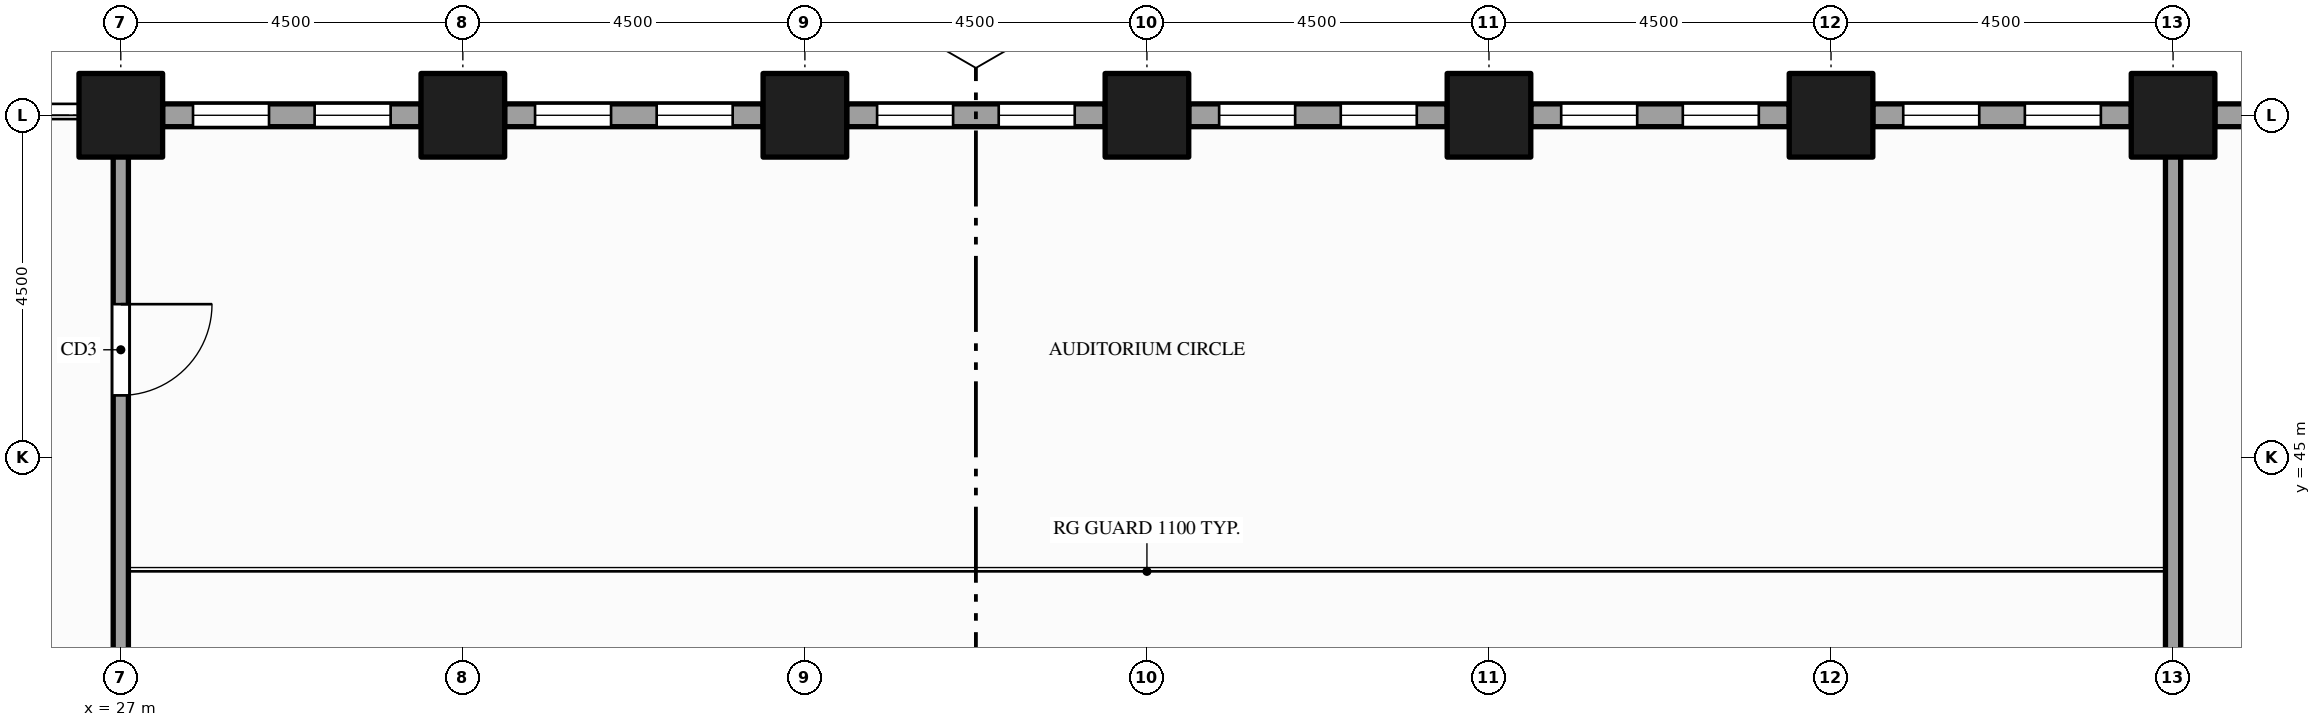
"""IFC4 building model, lengths in metres.
Left out: names, types, materials, properties, quantities, classifications, styles, units other than length and angle.
Written with IfcOpenShell. Run it as: python <this file> out.ifc"""

import sys

from ifc_helpers import new_model, si_unit, direction, frame, frame_2d, origin, origin_2d, place, context, subcontext, project, spatial, rectangle, hollow_rectangle, extrude, element, fill, save


model = new_model("IFC4")
c1 = context("Model", 3, precision=1e-05, world=origin(), true_north=direction((0.0, 1.0)))
c2 = subcontext(c1, "Body", "Model", "MODEL_VIEW")
j1 = project(units=[si_unit("LENGTHUNIT", "METRE"), si_unit("PLANEANGLEUNIT", "RADIAN")], contexts=[c1])
p1 = place(None, origin())
s1 = spatial("IfcSite", under=j1, at=p1, CompositionType="ELEMENT")
p2 = place(p1, origin())
s2 = spatial("IfcBuilding", under=s1, at=p2, CompositionType="ELEMENT")
p3 = place(p2, frame((0.0, 0.0, 8.0)))
s3 = spatial("IfcBuildingStorey", under=s2, at=p3, CompositionType="ELEMENT", Elevation=8.0)
for number, where, z_axis, x_axis in (
    (1, (27.0, 49.5, -0.25), (0.0, 0.0, 1.0), (1.0, 0.0, 0.0)),
    (2, (31.5, 49.5, -0.25), (0.0, 0.0, 1.0), (1.0, 0.0, 0.0)),
    (3, (36.0, 49.5, -0.25), (0.0, 0.0, 1.0), (1.0, 0.0, 0.0)),
    (4, (40.5, 49.5, -0.25), (0.0, 0.0, 1.0), (1.0, 0.0, 0.0)),
    (5, (45.0, 49.5, -0.25), (0.0, 0.0, 1.0), (1.0, 0.0, 0.0)),
    (6, (49.5, 49.5, -0.25), (0.0, 0.0, 1.0), (1.0, 0.0, 0.0)),
    (7, (54.0, 49.5, -0.25), (0.0, 0.0, 1.0), (1.0, 0.0, 0.0)),
):
    element("IfcColumn", number, at=place(p3, frame(where, z_axis=z_axis, x_axis=x_axis)), inside=s3, PredefinedType="COLUMN", context=c2, shape_type="SweptSolid", body=[
        extrude(hollow_rectangle(XDim=1.1, YDim=1.1, WallThickness=0.06, at=origin_2d()), origin(), (0.0, 0.0, 1.0), 6.0),
    ])
p4 = place(p3, frame((57.95, 49.5, 0.0), z_axis=(0.0, 0.0, 1.0), x_axis=(-1.0, 0.0, 0.0)))
e8 = element("IfcWall", 8, at=p4, inside=s3, PredefinedType="STANDARD", context=c2, shape_type="SweptSolid", body=[
    extrude(rectangle(XDim=3.4, YDim=0.3, at=frame_2d((1.7, 0.0))), origin(), (0.0, 0.0, 1.0), 5.036),
])
p5 = place(p4, frame((0.4, 0.0, 0.9)))
e9 = element("IfcOpeningElement", 9, at=p5, cuts=e8, PredefinedType="OPENING", context=c2, shape_type="SweptSolid", body=[
    extrude(rectangle(XDim=1.0, YDim=3.5, at=frame_2d((0.5, 1.75))), frame((0.0, 0.16, 0.0), z_axis=(0.0, -1.0, 0.0), x_axis=(1.0, 0.0, 0.0)), (0.0, 0.0, 1.0), 0.32),
])
p6 = place(p4, frame((2.0, 0.0, 0.9)))
e10 = element("IfcOpeningElement", 10, at=p6, cuts=e8, PredefinedType="OPENING", context=c2, shape_type="SweptSolid", body=[
    extrude(rectangle(XDim=1.0, YDim=3.5, at=frame_2d((0.5, 1.75))), frame((0.0, 0.16, 0.0), z_axis=(0.0, -1.0, 0.0), x_axis=(1.0, 0.0, 0.0)), (0.0, 0.0, 1.0), 0.32),
])
p7 = place(p3, frame((53.45, 49.5, 0.0), z_axis=(0.0, 0.0, 1.0), x_axis=(-1.0, 0.0, 0.0)))
e11 = element("IfcWall", 11, at=p7, inside=s3, PredefinedType="STANDARD", context=c2, shape_type="SweptSolid", body=[
    extrude(rectangle(XDim=3.4, YDim=0.3, at=frame_2d((1.7, 0.0))), origin(), (0.0, 0.0, 1.0), 5.036),
])
p8 = place(p7, frame((0.4, 0.0, 0.9)))
e12 = element("IfcOpeningElement", 12, at=p8, cuts=e11, PredefinedType="OPENING", context=c2, shape_type="SweptSolid", body=[
    extrude(rectangle(XDim=1.0, YDim=3.5, at=frame_2d((0.5, 1.75))), frame((0.0, 0.16, 0.0), z_axis=(0.0, -1.0, 0.0), x_axis=(1.0, 0.0, 0.0)), (0.0, 0.0, 1.0), 0.32),
])
p9 = place(p7, frame((2.0, 0.0, 0.9)))
e13 = element("IfcOpeningElement", 13, at=p9, cuts=e11, PredefinedType="OPENING", context=c2, shape_type="SweptSolid", body=[
    extrude(rectangle(XDim=1.0, YDim=3.5, at=frame_2d((0.5, 1.75))), frame((0.0, 0.16, 0.0), z_axis=(0.0, -1.0, 0.0), x_axis=(1.0, 0.0, 0.0)), (0.0, 0.0, 1.0), 0.32),
])
p10 = place(p3, frame((48.95, 49.5, 0.0), z_axis=(0.0, 0.0, 1.0), x_axis=(-1.0, 0.0, 0.0)))
e14 = element("IfcWall", 14, at=p10, inside=s3, PredefinedType="STANDARD", context=c2, shape_type="SweptSolid", body=[
    extrude(rectangle(XDim=3.4, YDim=0.3, at=frame_2d((1.7, 0.0))), origin(), (0.0, 0.0, 1.0), 5.036),
])
p11 = place(p10, frame((0.4, 0.0, 0.9)))
e15 = element("IfcOpeningElement", 15, at=p11, cuts=e14, PredefinedType="OPENING", context=c2, shape_type="SweptSolid", body=[
    extrude(rectangle(XDim=1.0, YDim=3.5, at=frame_2d((0.5, 1.75))), frame((0.0, 0.16, 0.0), z_axis=(0.0, -1.0, 0.0), x_axis=(1.0, 0.0, 0.0)), (0.0, 0.0, 1.0), 0.32),
])
p12 = place(p10, frame((2.0, 0.0, 0.9)))
e16 = element("IfcOpeningElement", 16, at=p12, cuts=e14, PredefinedType="OPENING", context=c2, shape_type="SweptSolid", body=[
    extrude(rectangle(XDim=1.0, YDim=3.5, at=frame_2d((0.5, 1.75))), frame((0.0, 0.16, 0.0), z_axis=(0.0, -1.0, 0.0), x_axis=(1.0, 0.0, 0.0)), (0.0, 0.0, 1.0), 0.32),
])
p13 = place(p3, frame((44.45, 49.5, 0.0), z_axis=(0.0, 0.0, 1.0), x_axis=(-1.0, 0.0, 0.0)))
e17 = element("IfcWall", 17, at=p13, inside=s3, PredefinedType="STANDARD", context=c2, shape_type="SweptSolid", body=[
    extrude(rectangle(XDim=3.4, YDim=0.3, at=frame_2d((1.7, 0.0))), origin(), (0.0, 0.0, 1.0), 5.036),
])
p14 = place(p13, frame((0.4, 0.0, 0.9)))
e18 = element("IfcOpeningElement", 18, at=p14, cuts=e17, PredefinedType="OPENING", context=c2, shape_type="SweptSolid", body=[
    extrude(rectangle(XDim=1.0, YDim=3.5, at=frame_2d((0.5, 1.75))), frame((0.0, 0.16, 0.0), z_axis=(0.0, -1.0, 0.0), x_axis=(1.0, 0.0, 0.0)), (0.0, 0.0, 1.0), 0.32),
])
p15 = place(p13, frame((2.0, 0.0, 0.9)))
e19 = element("IfcOpeningElement", 19, at=p15, cuts=e17, PredefinedType="OPENING", context=c2, shape_type="SweptSolid", body=[
    extrude(rectangle(XDim=1.0, YDim=3.5, at=frame_2d((0.5, 1.75))), frame((0.0, 0.16, 0.0), z_axis=(0.0, -1.0, 0.0), x_axis=(1.0, 0.0, 0.0)), (0.0, 0.0, 1.0), 0.32),
])
p16 = place(p3, frame((39.95, 49.5, 0.0), z_axis=(0.0, 0.0, 1.0), x_axis=(-1.0, 0.0, 0.0)))
e20 = element("IfcWall", 20, at=p16, inside=s3, PredefinedType="STANDARD", context=c2, shape_type="SweptSolid", body=[
    extrude(rectangle(XDim=3.4, YDim=0.3, at=frame_2d((1.7, 0.0))), origin(), (0.0, 0.0, 1.0), 5.036),
])
p17 = place(p16, frame((0.4, 0.0, 0.9)))
e21 = element("IfcOpeningElement", 21, at=p17, cuts=e20, PredefinedType="OPENING", context=c2, shape_type="SweptSolid", body=[
    extrude(rectangle(XDim=1.0, YDim=3.5, at=frame_2d((0.5, 1.75))), frame((0.0, 0.16, 0.0), z_axis=(0.0, -1.0, 0.0), x_axis=(1.0, 0.0, 0.0)), (0.0, 0.0, 1.0), 0.32),
])
p18 = place(p16, frame((2.0, 0.0, 0.9)))
e22 = element("IfcOpeningElement", 22, at=p18, cuts=e20, PredefinedType="OPENING", context=c2, shape_type="SweptSolid", body=[
    extrude(rectangle(XDim=1.0, YDim=3.5, at=frame_2d((0.5, 1.75))), frame((0.0, 0.16, 0.0), z_axis=(0.0, -1.0, 0.0), x_axis=(1.0, 0.0, 0.0)), (0.0, 0.0, 1.0), 0.32),
])
p19 = place(p3, frame((35.45, 49.5, 0.0), z_axis=(0.0, 0.0, 1.0), x_axis=(-1.0, 0.0, 0.0)))
e23 = element("IfcWall", 23, at=p19, inside=s3, PredefinedType="STANDARD", context=c2, shape_type="SweptSolid", body=[
    extrude(rectangle(XDim=3.4, YDim=0.3, at=frame_2d((1.7, 0.0))), origin(), (0.0, 0.0, 1.0), 5.036),
])
p20 = place(p19, frame((0.4, 0.0, 0.9)))
e24 = element("IfcOpeningElement", 24, at=p20, cuts=e23, PredefinedType="OPENING", context=c2, shape_type="SweptSolid", body=[
    extrude(rectangle(XDim=1.0, YDim=3.5, at=frame_2d((0.5, 1.75))), frame((0.0, 0.16, 0.0), z_axis=(0.0, -1.0, 0.0), x_axis=(1.0, 0.0, 0.0)), (0.0, 0.0, 1.0), 0.32),
])
p21 = place(p19, frame((2.0, 0.0, 0.9)))
e25 = element("IfcOpeningElement", 25, at=p21, cuts=e23, PredefinedType="OPENING", context=c2, shape_type="SweptSolid", body=[
    extrude(rectangle(XDim=1.0, YDim=3.5, at=frame_2d((0.5, 1.75))), frame((0.0, 0.16, 0.0), z_axis=(0.0, -1.0, 0.0), x_axis=(1.0, 0.0, 0.0)), (0.0, 0.0, 1.0), 0.32),
])
p22 = place(p3, frame((30.95, 49.5, 0.0), z_axis=(0.0, 0.0, 1.0), x_axis=(-1.0, 0.0, 0.0)))
e26 = element("IfcWall", 26, at=p22, inside=s3, PredefinedType="STANDARD", context=c2, shape_type="SweptSolid", body=[
    extrude(rectangle(XDim=3.4, YDim=0.3, at=frame_2d((1.7, 0.0))), origin(), (0.0, 0.0, 1.0), 5.036),
])
p23 = place(p22, frame((0.4, 0.0, 0.9)))
e27 = element("IfcOpeningElement", 27, at=p23, cuts=e26, PredefinedType="OPENING", context=c2, shape_type="SweptSolid", body=[
    extrude(rectangle(XDim=1.0, YDim=3.5, at=frame_2d((0.5, 1.75))), frame((0.0, 0.16, 0.0), z_axis=(0.0, -1.0, 0.0), x_axis=(1.0, 0.0, 0.0)), (0.0, 0.0, 1.0), 0.32),
])
p24 = place(p22, frame((2.0, 0.0, 0.9)))
e28 = element("IfcOpeningElement", 28, at=p24, cuts=e26, PredefinedType="OPENING", context=c2, shape_type="SweptSolid", body=[
    extrude(rectangle(XDim=1.0, YDim=3.5, at=frame_2d((0.5, 1.75))), frame((0.0, 0.16, 0.0), z_axis=(0.0, -1.0, 0.0), x_axis=(1.0, 0.0, 0.0)), (0.0, 0.0, 1.0), 0.32),
])
p25 = place(p3, frame((27.0, 26.7, 0.0), z_axis=(0.0, 0.0, 1.0), x_axis=(0.0, 1.0, 0.0)))
e29 = element("IfcWall", 29, at=p25, inside=s3, PredefinedType="PARTITIONING", context=c2, shape_type="SweptSolid", body=[
    extrude(rectangle(XDim=22.65, YDim=0.2, at=frame_2d((11.325, 0.0))), origin(), (0.0, 0.0, 1.0), 4.66),
])
p26 = place(p25, frame((19.115, 0.0, 0.0)))
e30 = element("IfcOpeningElement", 30, at=p26, cuts=e29, PredefinedType="OPENING", context=c2, shape_type="SweptSolid", body=[
    extrude(rectangle(XDim=1.2, YDim=2.1, at=frame_2d((0.6, 1.05))), frame((0.0, 0.11, 0.0), z_axis=(0.0, -1.0, 0.0), x_axis=(1.0, 0.0, 0.0)), (0.0, 0.0, 1.0), 0.22),
])
p27 = place(p3, frame((54.0, 26.7, 0.0), z_axis=(0.0, 0.0, 1.0), x_axis=(0.0, 1.0, 0.0)))
e31 = element("IfcWall", 31, at=p27, inside=s3, PredefinedType="PARTITIONING", context=c2, shape_type="SweptSolid", body=[
    extrude(rectangle(XDim=22.65, YDim=0.2, at=frame_2d((11.325, 0.0))), origin(), (0.0, 0.0, 1.0), 4.66),
])
p28 = place(p8, origin())
e32 = element("IfcWindow", 32, at=p28, inside=s3, PartitioningType="SINGLE_PANEL", PredefinedType="WINDOW", context=c2, shape_type="SweptSolid", body=[
    extrude(rectangle(XDim=1.0, YDim=3.5, at=frame_2d((0.5, 1.75))), frame((0.0, 0.03, 0.0), z_axis=(0.0, -1.0, 0.0), x_axis=(1.0, 0.0, 0.0)), (0.0, 0.0, 1.0), 0.06),
])
fill(e12, e32)
p29 = place(p9, origin())
e33 = element("IfcWindow", 33, at=p29, inside=s3, PartitioningType="SINGLE_PANEL", PredefinedType="WINDOW", context=c2, shape_type="SweptSolid", body=[
    extrude(rectangle(XDim=1.0, YDim=3.5, at=frame_2d((0.5, 1.75))), frame((0.0, 0.03, 0.0), z_axis=(0.0, -1.0, 0.0), x_axis=(1.0, 0.0, 0.0)), (0.0, 0.0, 1.0), 0.06),
])
fill(e13, e33)
p30 = place(p11, origin())
e34 = element("IfcWindow", 34, at=p30, inside=s3, PartitioningType="SINGLE_PANEL", PredefinedType="WINDOW", context=c2, shape_type="SweptSolid", body=[
    extrude(rectangle(XDim=1.0, YDim=3.5, at=frame_2d((0.5, 1.75))), frame((0.0, 0.03, 0.0), z_axis=(0.0, -1.0, 0.0), x_axis=(1.0, 0.0, 0.0)), (0.0, 0.0, 1.0), 0.06),
])
fill(e15, e34)
p31 = place(p12, origin())
e35 = element("IfcWindow", 35, at=p31, inside=s3, PartitioningType="SINGLE_PANEL", PredefinedType="WINDOW", context=c2, shape_type="SweptSolid", body=[
    extrude(rectangle(XDim=1.0, YDim=3.5, at=frame_2d((0.5, 1.75))), frame((0.0, 0.03, 0.0), z_axis=(0.0, -1.0, 0.0), x_axis=(1.0, 0.0, 0.0)), (0.0, 0.0, 1.0), 0.06),
])
fill(e16, e35)
p32 = place(p14, origin())
e36 = element("IfcWindow", 36, at=p32, inside=s3, PartitioningType="SINGLE_PANEL", PredefinedType="WINDOW", context=c2, shape_type="SweptSolid", body=[
    extrude(rectangle(XDim=1.0, YDim=3.5, at=frame_2d((0.5, 1.75))), frame((0.0, 0.03, 0.0), z_axis=(0.0, -1.0, 0.0), x_axis=(1.0, 0.0, 0.0)), (0.0, 0.0, 1.0), 0.06),
])
fill(e18, e36)
p33 = place(p15, origin())
e37 = element("IfcWindow", 37, at=p33, inside=s3, PartitioningType="SINGLE_PANEL", PredefinedType="WINDOW", context=c2, shape_type="SweptSolid", body=[
    extrude(rectangle(XDim=1.0, YDim=3.5, at=frame_2d((0.5, 1.75))), frame((0.0, 0.03, 0.0), z_axis=(0.0, -1.0, 0.0), x_axis=(1.0, 0.0, 0.0)), (0.0, 0.0, 1.0), 0.06),
])
fill(e19, e37)
p34 = place(p17, origin())
e38 = element("IfcWindow", 38, at=p34, inside=s3, PartitioningType="SINGLE_PANEL", PredefinedType="WINDOW", context=c2, shape_type="SweptSolid", body=[
    extrude(rectangle(XDim=1.0, YDim=3.5, at=frame_2d((0.5, 1.75))), frame((0.0, 0.03, 0.0), z_axis=(0.0, -1.0, 0.0), x_axis=(1.0, 0.0, 0.0)), (0.0, 0.0, 1.0), 0.06),
])
fill(e21, e38)
p35 = place(p18, origin())
e39 = element("IfcWindow", 39, at=p35, inside=s3, PartitioningType="SINGLE_PANEL", PredefinedType="WINDOW", context=c2, shape_type="SweptSolid", body=[
    extrude(rectangle(XDim=1.0, YDim=3.5, at=frame_2d((0.5, 1.75))), frame((0.0, 0.03, 0.0), z_axis=(0.0, -1.0, 0.0), x_axis=(1.0, 0.0, 0.0)), (0.0, 0.0, 1.0), 0.06),
])
fill(e22, e39)
p36 = place(p20, origin())
e40 = element("IfcWindow", 40, at=p36, inside=s3, PartitioningType="SINGLE_PANEL", PredefinedType="WINDOW", context=c2, shape_type="SweptSolid", body=[
    extrude(rectangle(XDim=1.0, YDim=3.5, at=frame_2d((0.5, 1.75))), frame((0.0, 0.03, 0.0), z_axis=(0.0, -1.0, 0.0), x_axis=(1.0, 0.0, 0.0)), (0.0, 0.0, 1.0), 0.06),
])
fill(e24, e40)
p37 = place(p21, origin())
e41 = element("IfcWindow", 41, at=p37, inside=s3, PartitioningType="SINGLE_PANEL", PredefinedType="WINDOW", context=c2, shape_type="SweptSolid", body=[
    extrude(rectangle(XDim=1.0, YDim=3.5, at=frame_2d((0.5, 1.75))), frame((0.0, 0.03, 0.0), z_axis=(0.0, -1.0, 0.0), x_axis=(1.0, 0.0, 0.0)), (0.0, 0.0, 1.0), 0.06),
])
fill(e25, e41)
p38 = place(p23, origin())
e42 = element("IfcWindow", 42, at=p38, inside=s3, PartitioningType="SINGLE_PANEL", PredefinedType="WINDOW", context=c2, shape_type="SweptSolid", body=[
    extrude(rectangle(XDim=1.0, YDim=3.5, at=frame_2d((0.5, 1.75))), frame((0.0, 0.03, 0.0), z_axis=(0.0, -1.0, 0.0), x_axis=(1.0, 0.0, 0.0)), (0.0, 0.0, 1.0), 0.06),
])
fill(e27, e42)
p39 = place(p24, origin())
e43 = element("IfcWindow", 43, at=p39, inside=s3, PartitioningType="SINGLE_PANEL", PredefinedType="WINDOW", context=c2, shape_type="SweptSolid", body=[
    extrude(rectangle(XDim=1.0, YDim=3.5, at=frame_2d((0.5, 1.75))), frame((0.0, 0.03, 0.0), z_axis=(0.0, -1.0, 0.0), x_axis=(1.0, 0.0, 0.0)), (0.0, 0.0, 1.0), 0.06),
])
fill(e28, e43)
p40 = place(p26, origin())
e44 = element("IfcDoor", 44, at=p40, inside=s3, OperationType="SINGLE_SWING_RIGHT", PredefinedType="DOOR", context=c2, shape_type="SweptSolid", body=[
    extrude(rectangle(XDim=1.2, YDim=2.1, at=frame_2d((0.6, 1.05))), frame((0.0, 0.025, 0.0), z_axis=(0.0, -1.0, 0.0), x_axis=(1.0, 0.0, 0.0)), (0.0, 0.0, 1.0), 0.05),
])
fill(e30, e44)
save(model, sys.argv[1])
